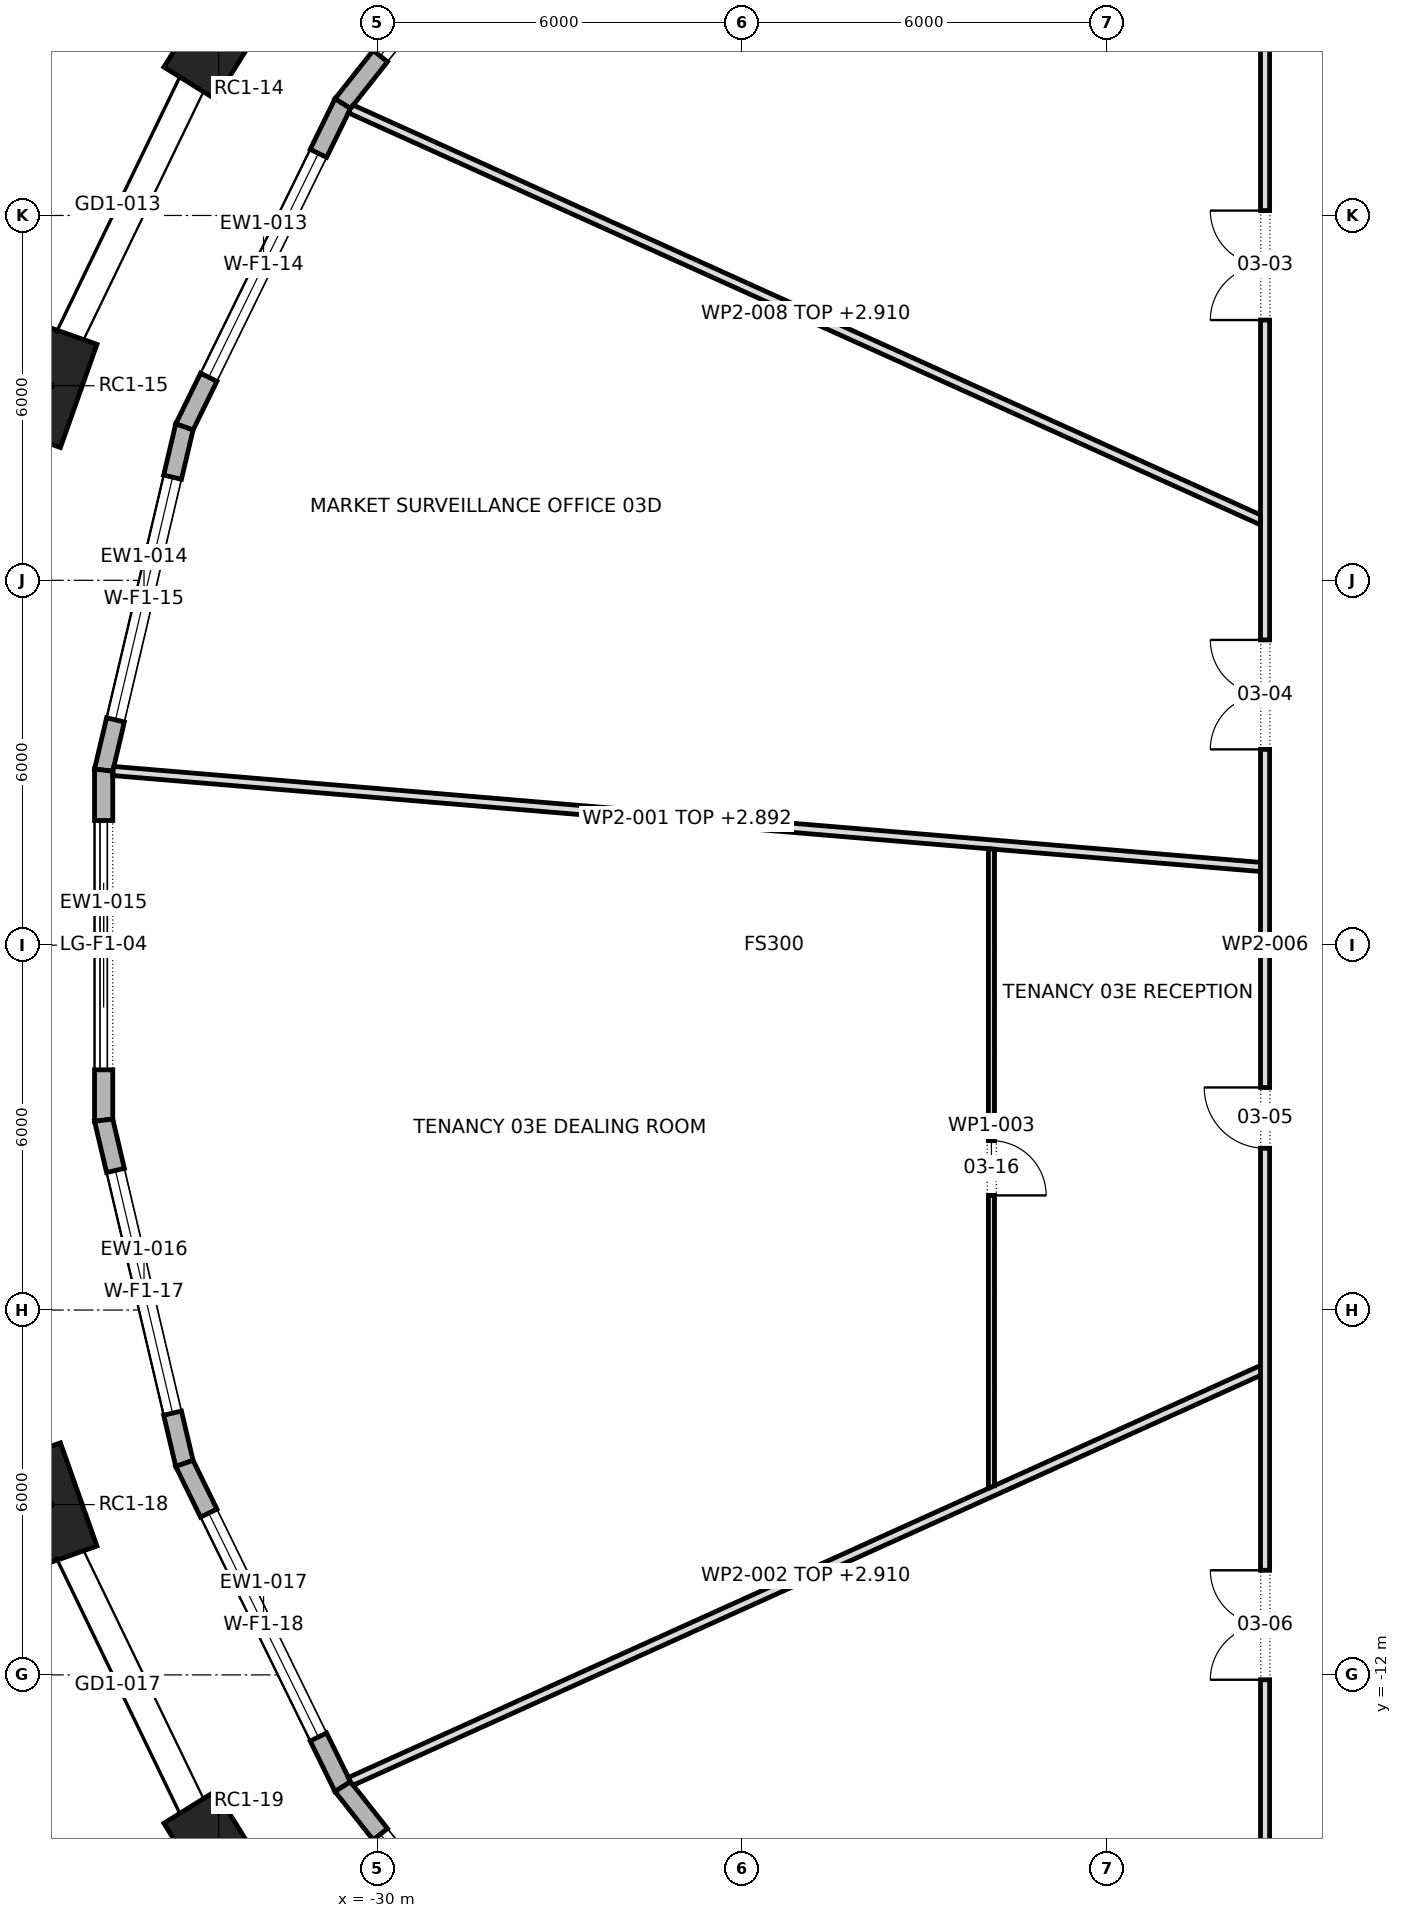
"""IFC4 building model, lengths in metres.
Left out: names, types, materials, properties, quantities, classifications, styles, units other than length and angle.
Written with IfcOpenShell. Run it as: python <this file> out.ifc"""

import sys

from ifc_helpers import new_model, si_unit, direction, frame, frame_2d, origin, origin_2d, place, context, subcontext, project, spatial, polyline, rectangle, outline, extrude, element, fill, save


model = new_model("IFC4")
c1 = context("Model", 3, precision=1e-05, world=origin(), true_north=direction((0.0, 1.0)))
c2 = subcontext(c1, "Body", "Model", "MODEL_VIEW")
j1 = project(units=[si_unit("LENGTHUNIT", "METRE"), si_unit("PLANEANGLEUNIT", "RADIAN")], contexts=[c1])
p1 = place(None, origin())
s1 = spatial("IfcSite", under=j1, at=p1, CompositionType="ELEMENT")
p2 = place(p1, origin())
s2 = spatial("IfcBuilding", under=s1, at=p2, CompositionType="ELEMENT")
p3 = place(p2, frame((0.0, 0.0, 57.1)))
s3 = spatial("IfcBuildingStorey", under=s2, at=p3, CompositionType="ELEMENT", Elevation=57.1)
for number, where, z_axis, x_axis in (
    (1, (-32.608, 14.939, 0.0), (0.0, 0.0, 1.0), (-0.529, -0.849, 0.0)),
    (2, (-35.382, 9.2, 0.0), (0.0, 0.0, 1.0), (-0.334, -0.943, 0.0)),
    (3, (-35.382, -9.2, 0.0), (0.0, 0.0, 1.0), (0.334, -0.943, 0.0)),
    (4, (-32.608, -14.939, 0.0), (0.0, 0.0, 1.0), (0.529, -0.849, 0.0)),
):
    element("IfcColumn", number, at=place(p3, frame(where, z_axis=z_axis, x_axis=x_axis)), inside=s3, PredefinedType="COLUMN", context=c2, shape_type="SweptSolid", body=[
        extrude(rectangle(XDim=1.8, YDim=1.0, at=origin_2d()), origin(), (0.0, 0.0, 1.0), 4.2),
    ])
p4 = place(p3, frame((-26.79, 18.62, 0.0), z_axis=(0.0, 0.0, 1.0), x_axis=(-0.619993638342, -0.78460683684, 0.0)))
e5 = element("IfcWall", 5, at=p4, inside=s3, PredefinedType="STANDARD", context=c2, shape_type="SweptSolid", body=[
    extrude(outline(polyline([(-0.015, -0.15), (6.11, -0.15), (6.078, 0.15), (0.015, 0.15), (-0.015, -0.15)])), origin(), (0.0, 0.0, 1.0), 3.9),
])
p5 = place(p4, frame((0.997, 0.0, 0.6)))
e6 = element("IfcOpeningElement", 6, at=p5, cuts=e5, PredefinedType="OPENING", context=c2, shape_type="SweptSolid", body=[
    extrude(rectangle(XDim=4.1, YDim=2.85, at=frame_2d((2.05, 1.425))), frame((0.0, 0.162, 0.0), z_axis=(0.0, -1.0, 0.0), x_axis=(1.0, 0.0, 0.0)), (0.0, 0.0, 1.0), 0.324),
])
p6 = place(p3, frame((-30.568, 13.838, 0.0), z_axis=(0.0, 0.0, 1.0), x_axis=(-0.439906146647, -0.898043752911, 0.0)))
e7 = element("IfcWall", 7, at=p6, inside=s3, PredefinedType="STANDARD", context=c2, shape_type="SweptSolid", body=[
    extrude(outline(polyline([(-0.016, -0.15), (5.936, -0.15), (5.902, 0.15), (0.016, 0.15), (-0.016, -0.15)])), origin(), (0.0, 0.0, 1.0), 3.9),
])
p7 = place(p6, frame((0.909, 0.0, 0.6)))
e8 = element("IfcOpeningElement", 8, at=p7, cuts=e7, PredefinedType="OPENING", context=c2, shape_type="SweptSolid", body=[
    extrude(rectangle(XDim=4.1, YDim=2.85, at=frame_2d((2.05, 1.425))), frame((0.0, 0.162, 0.0), z_axis=(0.0, -1.0, 0.0), x_axis=(1.0, 0.0, 0.0)), (0.0, 0.0, 1.0), 0.324),
])
p8 = place(p3, frame((-33.172, 8.523, 0.0), z_axis=(0.0, 0.0, 1.0), x_axis=(-0.228990053972, -0.973428762253, 0.0)))
e9 = element("IfcWall", 9, at=p8, inside=s3, PredefinedType="STANDARD", context=c2, shape_type="SweptSolid", body=[
    extrude(outline(polyline([(-0.017, -0.15), (5.816, -0.15), (5.781, 0.15), (0.017, 0.15), (-0.017, -0.15)])), origin(), (0.0, 0.0, 1.0), 3.9),
])
p9 = place(p8, frame((0.849, 0.0, 0.6)))
e10 = element("IfcOpeningElement", 10, at=p9, cuts=e9, PredefinedType="OPENING", context=c2, shape_type="SweptSolid", body=[
    extrude(rectangle(XDim=4.1, YDim=2.85, at=frame_2d((2.05, 1.425))), frame((0.0, 0.162, 0.0), z_axis=(0.0, -1.0, 0.0), x_axis=(1.0, 0.0, 0.0)), (0.0, 0.0, 1.0), 0.324),
])
p10 = place(p3, frame((-34.5, 2.878, 0.0), z_axis=(0.0, 0.0, 1.0), x_axis=(0.0, -1.0, 0.0)))
e11 = element("IfcWall", 11, at=p10, inside=s3, PredefinedType="STANDARD", context=c2, shape_type="SweptSolid", body=[
    extrude(outline(polyline([(-0.017, -0.15), (5.773, -0.15), (5.739, 0.15), (0.017, 0.15), (-0.017, -0.15)])), origin(), (0.0, 0.0, 1.0), 3.9),
])
p11 = place(p10, frame((0.828, 0.0, 0.0)))
e12 = element("IfcOpeningElement", 12, at=p11, cuts=e11, PredefinedType="OPENING", context=c2, shape_type="SweptSolid", body=[
    extrude(rectangle(XDim=4.1, YDim=3.45, at=frame_2d((2.05, 1.725))), frame((0.0, 0.162, 0.0), z_axis=(0.0, -1.0, 0.0), x_axis=(1.0, 0.0, 0.0)), (0.0, 0.0, 1.0), 0.324),
])
p12 = place(p3, frame((-34.5, -2.878, 0.0), z_axis=(0.0, 0.0, 1.0), x_axis=(0.228990053972, -0.973428762253, 0.0)))
e13 = element("IfcWall", 13, at=p12, inside=s3, PredefinedType="STANDARD", context=c2, shape_type="SweptSolid", body=[
    extrude(outline(polyline([(-0.017, -0.15), (5.816, -0.15), (5.782, 0.15), (0.017, 0.15), (-0.017, -0.15)])), origin(), (0.0, 0.0, 1.0), 3.9),
])
p13 = place(p12, frame((0.849, 0.0, 0.6)))
e14 = element("IfcOpeningElement", 14, at=p13, cuts=e13, PredefinedType="OPENING", context=c2, shape_type="SweptSolid", body=[
    extrude(rectangle(XDim=4.1, YDim=2.85, at=frame_2d((2.05, 1.425))), frame((0.0, 0.162, 0.0), z_axis=(0.0, -1.0, 0.0), x_axis=(1.0, 0.0, 0.0)), (0.0, 0.0, 1.0), 0.324),
])
p14 = place(p3, frame((-33.172, -8.523, 0.0), z_axis=(0.0, 0.0, 1.0), x_axis=(0.439906146647, -0.898043752911, 0.0)))
e15 = element("IfcWall", 15, at=p14, inside=s3, PredefinedType="STANDARD", context=c2, shape_type="SweptSolid", body=[
    extrude(outline(polyline([(-0.017, -0.15), (5.935, -0.15), (5.903, 0.15), (0.017, 0.15), (-0.017, -0.15)])), origin(), (0.0, 0.0, 1.0), 3.9),
])
p15 = place(p14, frame((0.909, 0.0, 0.6)))
e16 = element("IfcOpeningElement", 16, at=p15, cuts=e15, PredefinedType="OPENING", context=c2, shape_type="SweptSolid", body=[
    extrude(rectangle(XDim=4.1, YDim=2.85, at=frame_2d((2.05, 1.425))), frame((0.0, 0.162, 0.0), z_axis=(0.0, -1.0, 0.0), x_axis=(1.0, 0.0, 0.0)), (0.0, 0.0, 1.0), 0.324),
])
p16 = place(p3, frame((-30.568, -13.838, 0.0), z_axis=(0.0, 0.0, 1.0), x_axis=(0.619993638342, -0.78460683684, 0.0)))
e17 = element("IfcWall", 17, at=p16, inside=s3, PredefinedType="STANDARD", context=c2, shape_type="SweptSolid", body=[
    extrude(outline(polyline([(-0.016, -0.15), (6.109, -0.15), (6.079, 0.15), (0.016, 0.15), (-0.016, -0.15)])), origin(), (0.0, 0.0, 1.0), 3.9),
])
p17 = place(p16, frame((0.997, 0.0, 0.6)))
e18 = element("IfcOpeningElement", 18, at=p17, cuts=e17, PredefinedType="OPENING", context=c2, shape_type="SweptSolid", body=[
    extrude(rectangle(XDim=4.1, YDim=2.85, at=frame_2d((2.05, 1.425))), frame((0.0, 0.162, 0.0), z_axis=(0.0, -1.0, 0.0), x_axis=(1.0, 0.0, 0.0)), (0.0, 0.0, 1.0), 0.324),
])
p18 = place(p3, frame((-34.343, 2.865, 0.0), z_axis=(0.0, 0.0, 1.0), x_axis=(0.996520554602, -0.083347371018, 0.0)))
e19 = element("IfcWall", 19, at=p18, inside=s3, PredefinedType="PARTITIONING", context=c2, shape_type="SweptSolid", body=[
    extrude(outline(polyline([(0.0, -0.075), (1.818, -0.075), (3.636, -0.075), (5.455, -0.075), (7.273, -0.075), (9.091, -0.075), (10.909, -0.075), (12.727, -0.075), (14.545, -0.075), (14.55, -0.074), (14.55, -0.075), (16.013, -0.075), (17.477, -0.075), (18.94, -0.075), (18.928, 0.075), (17.035, 0.075), (15.143, 0.075), (13.251, 0.075), (11.359, 0.075), (9.467, 0.075), (7.574, 0.075), (5.682, 0.075), (3.79, 0.075), (1.898, 0.075), (0.006, 0.075), (0.0, 0.038), (0.0, -0.075)])), origin(), (0.0, 0.0, 1.0), 2.892),
])
p19 = place(p3, frame((-30.444, -13.755, 0.0), z_axis=(0.0, 0.0, 1.0), x_axis=(0.911343853748, 0.411645940385, 0.0)))
e20 = element("IfcWall", 20, at=p19, inside=s3, PredefinedType="PARTITIONING", context=c2, shape_type="SweptSolid", body=[
    extrude(outline(polyline([(0.02, -0.075), (1.839, -0.075), (3.658, -0.075), (5.477, -0.075), (7.296, -0.075), (9.115, -0.075), (10.934, -0.075), (12.753, -0.075), (14.572, -0.075), (16.391, -0.075), (16.442, 0.038), (16.442, 0.038), (16.458, 0.075), (14.858, 0.075), (13.258, 0.075), (11.658, 0.075), (11.657, 0.073), (11.653, 0.075), (9.711, 0.075), (7.769, 0.075), (5.826, 0.075), (3.884, 0.075), (1.942, 0.075), (0.0, 0.075), (0.0, 0.062), (0.002, -0.004), (0.02, -0.075)])), origin(), (0.0, 0.0, 1.0), 2.91),
])
p20 = place(p3, frame((-19.9, -8.933, 0.0), z_axis=(0.0, 0.0, 1.0), x_axis=(0.0, 1.0, 0.0)))
e21 = element("IfcWall", 21, at=p20, inside=s3, PredefinedType="PARTITIONING", context=c2, shape_type="SweptSolid", body=[
    extrude(outline(polyline([(0.045, -0.05), (1.789, -0.05), (3.533, -0.05), (5.277, -0.05), (7.021, -0.05), (8.765, -0.05), (10.51, -0.05), (10.518, 0.046), (10.518, 0.05), (8.765, 0.05), (7.012, 0.05), (5.259, 0.05), (3.506, 0.05), (1.753, 0.05), (0.0, 0.05), (0.0, 0.05), (0.045, -0.05)])), origin(), (0.0, 0.0, 1.0), 3.9),
])
p21 = place(p20, frame((4.817, 0.0, 0.0)))
e22 = element("IfcOpeningElement", 22, at=p21, cuts=e21, PredefinedType="OPENING", context=c2, shape_type="SweptSolid", body=[
    extrude(rectangle(XDim=0.9, YDim=2.1, at=frame_2d((0.45, 1.05))), frame((0.0, 0.062, 0.0), z_axis=(0.0, -1.0, 0.0), x_axis=(1.0, 0.0, 0.0)), (0.0, 0.0, 1.0), 0.124),
])
p22 = place(p3, frame((-15.4, -15.475, 0.0), z_axis=(0.0, 0.0, 1.0), x_axis=(0.0, 1.0, 0.0)))
e23 = element("IfcWall", 23, at=p22, inside=s3, PredefinedType="PARTITIONING", context=c2, shape_type="SweptSolid", body=[
    extrude(outline(polyline([(0.15, -0.075), (2.066, -0.075), (3.981, -0.075), (5.897, -0.075), (7.812, -0.075), (9.728, -0.075), (11.644, -0.075), (13.56, -0.075), (15.475, -0.075), (17.391, -0.075), (19.306, -0.075), (21.222, -0.075), (23.138, -0.075), (25.053, -0.075), (26.969, -0.075), (28.885, -0.075), (30.8, -0.075), (30.95, 0.075), (29.016, 0.075), (27.081, 0.075), (25.147, 0.075), (23.212, 0.075), (21.278, 0.075), (19.344, 0.075), (17.409, 0.075), (15.475, 0.075), (13.541, 0.075), (11.606, 0.075), (9.672, 0.075), (7.738, 0.075), (5.803, 0.075), (3.869, 0.075), (1.935, 0.075), (0.0, 0.075), (0.15, -0.075)])), origin(), (0.0, 0.0, 1.0), 3.9),
])
p23 = place(p22, frame((25.755, 0.0, 0.0)))
e24 = element("IfcOpeningElement", 24, at=p23, cuts=e23, PredefinedType="OPENING", context=c2, shape_type="SweptSolid", body=[
    extrude(rectangle(XDim=1.8, YDim=2.1, at=frame_2d((0.9, 1.05))), frame((0.0, 0.087, 0.0), z_axis=(0.0, -1.0, 0.0), x_axis=(1.0, 0.0, 0.0)), (0.0, 0.0, 1.0), 0.174),
])
p24 = place(p22, frame((18.695, 0.0, 0.0)))
e25 = element("IfcOpeningElement", 25, at=p24, cuts=e23, PredefinedType="OPENING", context=c2, shape_type="SweptSolid", body=[
    extrude(rectangle(XDim=1.8, YDim=2.1, at=frame_2d((0.9, 1.05))), frame((0.0, 0.087, 0.0), z_axis=(0.0, -1.0, 0.0), x_axis=(1.0, 0.0, 0.0)), (0.0, 0.0, 1.0), 0.174),
])
p25 = place(p22, frame((12.135, 0.0, 0.0)))
e26 = element("IfcOpeningElement", 26, at=p25, cuts=e23, PredefinedType="OPENING", context=c2, shape_type="SweptSolid", body=[
    extrude(rectangle(XDim=1.0, YDim=2.1, at=frame_2d((0.5, 1.05))), frame((0.0, 0.087, 0.0), z_axis=(0.0, -1.0, 0.0), x_axis=(1.0, 0.0, 0.0)), (0.0, 0.0, 1.0), 0.174),
])
p26 = place(p22, frame((3.395, 0.0, 0.0)))
e27 = element("IfcOpeningElement", 27, at=p26, cuts=e23, PredefinedType="OPENING", context=c2, shape_type="SweptSolid", body=[
    extrude(rectangle(XDim=1.8, YDim=2.1, at=frame_2d((0.9, 1.05))), frame((0.0, 0.087, 0.0), z_axis=(0.0, -1.0, 0.0), x_axis=(1.0, 0.0, 0.0)), (0.0, 0.0, 1.0), 0.174),
])
p27 = place(p3, frame((-15.444, 6.98, 0.0), z_axis=(0.0, 0.0, 1.0), x_axis=(-0.911343853748, 0.411645940385, 0.0)))
e28 = element("IfcWall", 28, at=p27, inside=s3, PredefinedType="PARTITIONING", context=c2, shape_type="SweptSolid", body=[
    extrude(outline(polyline([(0.068, -0.075), (1.887, -0.075), (3.706, -0.075), (5.525, -0.075), (7.344, -0.075), (9.163, -0.075), (10.982, -0.075), (12.801, -0.075), (14.62, -0.075), (16.439, -0.075), (16.457, -0.004), (16.459, 0.064), (16.459, 0.075), (14.63, 0.075), (12.801, 0.075), (10.972, 0.075), (9.144, 0.075), (7.315, 0.075), (5.486, 0.075), (3.657, 0.075), (1.829, 0.075), (0.0, 0.075), (0.068, -0.075)])), origin(), (0.0, 0.0, 1.0), 2.91),
])
p28 = place(p5, origin())
e29 = element("IfcWindow", 29, at=p28, inside=s3, PartitioningType="TRIPLE_PANEL_VERTICAL", PredefinedType="WINDOW", context=c2, shape_type="SweptSolid", body=[
    extrude(rectangle(XDim=4.1, YDim=2.85, at=frame_2d((2.05, 1.425))), frame((0.0, 0.03, 0.0), z_axis=(0.0, -1.0, 0.0), x_axis=(1.0, 0.0, 0.0)), (0.0, 0.0, 1.0), 0.06),
])
fill(e6, e29)
p29 = place(p7, origin())
e30 = element("IfcWindow", 30, at=p29, inside=s3, PartitioningType="TRIPLE_PANEL_VERTICAL", PredefinedType="WINDOW", context=c2, shape_type="SweptSolid", body=[
    extrude(rectangle(XDim=4.1, YDim=2.85, at=frame_2d((2.05, 1.425))), frame((0.0, 0.03, 0.0), z_axis=(0.0, -1.0, 0.0), x_axis=(1.0, 0.0, 0.0)), (0.0, 0.0, 1.0), 0.06),
])
fill(e8, e30)
p30 = place(p9, origin())
e31 = element("IfcWindow", 31, at=p30, inside=s3, PartitioningType="TRIPLE_PANEL_VERTICAL", PredefinedType="WINDOW", context=c2, shape_type="SweptSolid", body=[
    extrude(rectangle(XDim=4.1, YDim=2.85, at=frame_2d((2.05, 1.425))), frame((0.0, 0.03, 0.0), z_axis=(0.0, -1.0, 0.0), x_axis=(1.0, 0.0, 0.0)), (0.0, 0.0, 1.0), 0.06),
])
fill(e10, e31)
p31 = place(p11, origin())
e32 = element("IfcDoor", 32, at=p31, inside=s3, OperationType="DOUBLE_DOOR_SLIDING", PredefinedType="DOOR", context=c2, shape_type="SweptSolid", body=[
    extrude(rectangle(XDim=4.1, YDim=3.45, at=frame_2d((2.05, 1.725))), frame((0.0, 0.025, 0.0), z_axis=(0.0, -1.0, 0.0), x_axis=(1.0, 0.0, 0.0)), (0.0, 0.0, 1.0), 0.05),
])
fill(e12, e32)
p32 = place(p13, origin())
e33 = element("IfcWindow", 33, at=p32, inside=s3, PartitioningType="TRIPLE_PANEL_VERTICAL", PredefinedType="WINDOW", context=c2, shape_type="SweptSolid", body=[
    extrude(rectangle(XDim=4.1, YDim=2.85, at=frame_2d((2.05, 1.425))), frame((0.0, 0.03, 0.0), z_axis=(0.0, -1.0, 0.0), x_axis=(1.0, 0.0, 0.0)), (0.0, 0.0, 1.0), 0.06),
])
fill(e14, e33)
p33 = place(p15, origin())
e34 = element("IfcWindow", 34, at=p33, inside=s3, PartitioningType="TRIPLE_PANEL_VERTICAL", PredefinedType="WINDOW", context=c2, shape_type="SweptSolid", body=[
    extrude(rectangle(XDim=4.1, YDim=2.85, at=frame_2d((2.05, 1.425))), frame((0.0, 0.03, 0.0), z_axis=(0.0, -1.0, 0.0), x_axis=(1.0, 0.0, 0.0)), (0.0, 0.0, 1.0), 0.06),
])
fill(e16, e34)
p34 = place(p17, origin())
e35 = element("IfcWindow", 35, at=p34, inside=s3, PartitioningType="TRIPLE_PANEL_VERTICAL", PredefinedType="WINDOW", context=c2, shape_type="SweptSolid", body=[
    extrude(rectangle(XDim=4.1, YDim=2.85, at=frame_2d((2.05, 1.425))), frame((0.0, 0.03, 0.0), z_axis=(0.0, -1.0, 0.0), x_axis=(1.0, 0.0, 0.0)), (0.0, 0.0, 1.0), 0.06),
])
fill(e18, e35)
p35 = place(p23, origin())
e36 = element("IfcDoor", 36, at=p35, inside=s3, OperationType="DOUBLE_DOOR_SINGLE_SWING", PredefinedType="DOOR", context=c2, shape_type="SweptSolid", body=[
    extrude(rectangle(XDim=1.8, YDim=2.1, at=frame_2d((0.9, 1.05))), frame((0.0, 0.025, 0.0), z_axis=(0.0, -1.0, 0.0), x_axis=(1.0, 0.0, 0.0)), (0.0, 0.0, 1.0), 0.05),
])
fill(e24, e36)
p36 = place(p24, origin())
e37 = element("IfcDoor", 37, at=p36, inside=s3, OperationType="DOUBLE_DOOR_SINGLE_SWING", PredefinedType="DOOR", context=c2, shape_type="SweptSolid", body=[
    extrude(rectangle(XDim=1.8, YDim=2.1, at=frame_2d((0.9, 1.05))), frame((0.0, 0.025, 0.0), z_axis=(0.0, -1.0, 0.0), x_axis=(1.0, 0.0, 0.0)), (0.0, 0.0, 1.0), 0.05),
])
fill(e25, e37)
p37 = place(p25, origin())
e38 = element("IfcDoor", 38, at=p37, inside=s3, OperationType="SINGLE_SWING_LEFT", PredefinedType="DOOR", context=c2, shape_type="SweptSolid", body=[
    extrude(rectangle(XDim=1.0, YDim=2.1, at=frame_2d((0.5, 1.05))), frame((0.0, 0.025, 0.0), z_axis=(0.0, -1.0, 0.0), x_axis=(1.0, 0.0, 0.0)), (0.0, 0.0, 1.0), 0.05),
])
fill(e26, e38)
p38 = place(p26, origin())
e39 = element("IfcDoor", 39, at=p38, inside=s3, OperationType="DOUBLE_DOOR_SINGLE_SWING", PredefinedType="DOOR", context=c2, shape_type="SweptSolid", body=[
    extrude(rectangle(XDim=1.8, YDim=2.1, at=frame_2d((0.9, 1.05))), frame((0.0, 0.025, 0.0), z_axis=(0.0, -1.0, 0.0), x_axis=(1.0, 0.0, 0.0)), (0.0, 0.0, 1.0), 0.05),
])
fill(e27, e39)
p39 = place(p21, frame((0.9, 0.0, 0.0), z_axis=(0.0, 0.0, 1.0), x_axis=(-1.0, 0.0, 0.0)))
e40 = element("IfcDoor", 40, at=p39, inside=s3, OperationType="SINGLE_SWING_LEFT", PredefinedType="DOOR", context=c2, shape_type="SweptSolid", body=[
    extrude(rectangle(XDim=0.9, YDim=2.1, at=frame_2d((0.45, 1.05))), frame((0.0, 0.025, 0.0), z_axis=(0.0, -1.0, 0.0), x_axis=(1.0, 0.0, 0.0)), (0.0, 0.0, 1.0), 0.05),
])
fill(e22, e40)
save(model, sys.argv[1])
